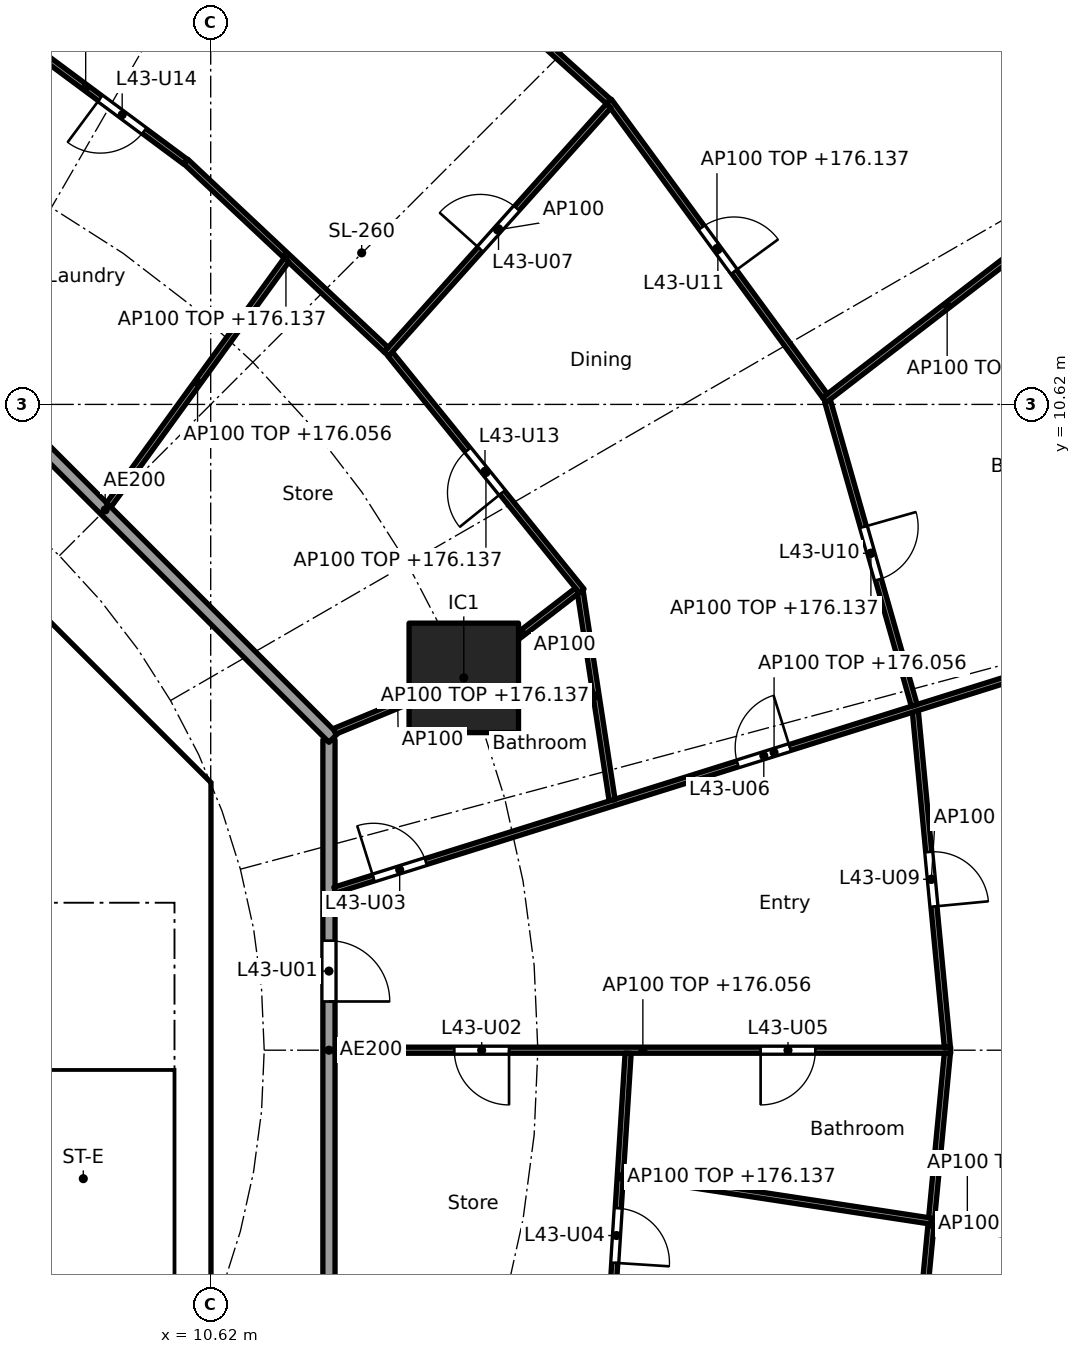
"""IFC4 building model, lengths in metres.
Left out: names, types, materials, properties, quantities, classifications, styles, units other than length and angle.
Written with IfcOpenShell. Run it as: python <this file> out.ifc"""

import sys

from ifc_helpers import new_model, si_unit, direction, frame, frame_2d, origin, origin_2d, place, context, subcontext, project, spatial, polyline, rectangle, outline, extrude, element, fill, save


model = new_model("IFC4")
c1 = context("Model", 3, precision=1e-05, world=origin(), true_north=direction((0.0, 1.0)))
c2 = subcontext(c1, "Body", "Model", "MODEL_VIEW")
j1 = project(units=[si_unit("LENGTHUNIT", "METRE"), si_unit("PLANEANGLEUNIT", "RADIAN")], contexts=[c1])
p1 = place(None, origin())
s1 = spatial("IfcSite", under=j1, at=p1, CompositionType="ELEMENT")
p2 = place(p1, origin())
s2 = spatial("IfcBuilding", under=s1, at=p2, CompositionType="ELEMENT")
p3 = place(p2, frame((0.0, 0.0, 173.3)))
s3 = spatial("IfcBuildingStorey", under=s2, at=p3, CompositionType="ELEMENT", Elevation=173.3)
p4 = place(p3, frame((14.782, 6.123, 0.0), z_axis=(0.0, 0.0, 1.0), x_axis=(1.0, 0.0, 0.0)))
e1 = element("IfcColumn", 1, at=p4, inside=s3, PredefinedType="COLUMN", context=c2, shape_type="SweptSolid", body=[
    extrude(rectangle(XDim=1.8, YDim=1.8, at=origin_2d()), origin(), (0.0, 0.0, 1.0), 3.7),
])
p5 = place(p3, frame((9.988, 4.613, 0.0), z_axis=(0.0, 0.0, 1.0), x_axis=(-0.707106781187, 0.707106781187, 0.0)))
e2 = element("IfcWall", 2, at=p5, inside=s3, PredefinedType="SHEAR", context=c2, shape_type="SweptSolid", body=[
    extrude(rectangle(XDim=7.602, YDim=0.6, at=frame_2d((3.801, 0.0))), origin(), (0.0, 0.0, 1.0), 3.44),
])
p6 = place(p5, frame((3.201, 0.0, 0.0)))
e3 = element("IfcOpeningElement", 3, at=p6, cuts=e2, PredefinedType="OPENING", context=c2, shape_type="SweptSolid", body=[
    extrude(rectangle(XDim=1.2, YDim=2.1, at=frame_2d((0.6, 1.05))), frame((0.0, 0.31, 0.0), z_axis=(0.0, -1.0, 0.0), x_axis=(1.0, 0.0, 0.0)), (0.0, 0.0, 1.0), 0.62),
])
p7 = place(p3, frame((6.7, 4.0, 0.0), z_axis=(0.0, 0.0, 1.0), x_axis=(1.0, 0.0, 0.0)))
e4 = element("IfcWall", 4, at=p7, inside=s3, PredefinedType="SOLIDWALL", context=c2, shape_type="SweptSolid", body=[
    extrude(rectangle(XDim=3.325, YDim=0.2, at=frame_2d((1.662, 0.0))), origin(), (0.0, 0.0, 1.0), 3.44),
])
p8 = place(p7, frame((1.25, 0.0, 0.0)))
e5 = element("IfcOpeningElement", 5, at=p8, cuts=e4, PredefinedType="OPENING", context=c2, shape_type="SweptSolid", body=[
    extrude(rectangle(XDim=1.1, YDim=2.1, at=frame_2d((0.55, 1.05))), frame((0.0, 0.11, 0.0), z_axis=(0.0, -1.0, 0.0), x_axis=(1.0, 0.0, 0.0)), (0.0, 0.0, 1.0), 0.22),
])
p9 = place(p3, origin())
e6 = element("IfcWall", 6, at=p9, inside=s3, PredefinedType="SHEAR", context=c2, shape_type="SweptSolid", body=[
    extrude(outline(polyline([(9.776, -4.401), (10.025, -4.152), (10.025, -3.801), (10.025, 4.152), (9.776, 4.401), (10.2, 4.825), (10.625, 4.401), (10.625, -4.401), (10.2, -4.825), (9.776, -4.401)])), origin(), (0.0, 0.0, 1.0), 3.44),
])
p10 = place(p3, frame((6.138, 14.83, 0.0), z_axis=(0.0, 0.0, 1.0), x_axis=(0.294818517221, 0.955553264818, 0.0)))
e7 = element("IfcWall", 7, at=p10, inside=s3, PredefinedType="PARTITIONING", context=c2, shape_type="SweptSolid", body=[
    extrude(rectangle(XDim=12.619, YDim=0.2, at=frame_2d((6.31, 0.0))), origin(), (0.0, 0.0, 1.0), 2.837),
])
p11 = place(p3, frame((12.565, -5.104, 0.0), z_axis=(0.0, 0.0, 1.0), x_axis=(0.0, 1.0, 0.0)))
e8 = element("IfcWall", 8, at=p11, inside=s3, PredefinedType="PARTITIONING", context=c2, shape_type="SweptSolid", body=[
    extrude(rectangle(XDim=10.209, YDim=0.2, at=frame_2d((5.104, 0.0))), origin(), (0.0, 0.0, 1.0), 3.44),
])
p12 = place(p11, frame((5.906, 0.0, 0.0)))
e9 = element("IfcOpeningElement", 9, at=p12, cuts=e8, PredefinedType="OPENING", context=c2, shape_type="SweptSolid", body=[
    extrude(rectangle(XDim=1.0, YDim=2.1, at=frame_2d((0.5, 1.05))), frame((0.0, 0.11, 0.0), z_axis=(0.0, -1.0, 0.0), x_axis=(1.0, 0.0, 0.0)), (0.0, 0.0, 1.0), 0.22),
])
p13 = place(p3, frame((12.635, 5.134, 0.0), z_axis=(0.0, 0.0, 1.0), x_axis=(-0.707106781187, 0.707106781187, 0.0)))
e10 = element("IfcWall", 10, at=p13, inside=s3, PredefinedType="PARTITIONING", context=c2, shape_type="SweptSolid", body=[
    extrude(rectangle(XDim=10.609, YDim=0.2, at=frame_2d((5.305, 0.0))), origin(), (0.0, 0.0, 1.0), 3.44),
])
p14 = place(p3, frame((12.665, 0.0, 0.0), z_axis=(0.0, 0.0, 1.0), x_axis=(1.0, 0.0, 0.0)))
e11 = element("IfcWall", 11, at=p14, inside=s3, PredefinedType="PARTITIONING", context=c2, shape_type="SweptSolid", body=[
    extrude(rectangle(XDim=10.124, YDim=0.1, at=frame_2d((5.062, 0.0))), origin(), (0.0, 0.0, 1.0), 2.756),
])
p15 = place(p14, frame((1.961, 0.0, 0.0)))
e12 = element("IfcOpeningElement", 12, at=p15, cuts=e11, PredefinedType="OPENING", context=c2, shape_type="SweptSolid", body=[
    extrude(rectangle(XDim=0.9, YDim=2.1, at=frame_2d((0.45, 1.05))), frame((0.0, 0.06, 0.0), z_axis=(0.0, -1.0, 0.0), x_axis=(1.0, 0.0, 0.0)), (0.0, 0.0, 1.0), 0.12),
])
p16 = place(p14, frame((6.999, 0.0, 0.0)))
e13 = element("IfcOpeningElement", 13, at=p16, cuts=e11, PredefinedType="OPENING", context=c2, shape_type="SweptSolid", body=[
    extrude(rectangle(XDim=0.9, YDim=2.1, at=frame_2d((0.45, 1.05))), frame((0.0, 0.06, 0.0), z_axis=(0.0, -1.0, 0.0), x_axis=(1.0, 0.0, 0.0)), (0.0, 0.0, 1.0), 0.12),
])
p17 = place(p3, frame((17.485, -0.05, 0.0), z_axis=(0.0, 0.0, 1.0), x_axis=(-0.063673473968, -0.997970785501, 0.0)))
e14 = element("IfcWall", 14, at=p17, inside=s3, PredefinedType="PARTITIONING", context=c2, shape_type="SweptSolid", body=[
    extrude(rectangle(XDim=4.072, YDim=0.1, at=frame_2d((2.036, 0.0))), origin(), (0.0, 0.0, 1.0), 2.837),
])
p18 = place(p17, frame((2.554, 0.0, 0.0)))
e15 = element("IfcOpeningElement", 15, at=p18, cuts=e14, PredefinedType="OPENING", context=c2, shape_type="SweptSolid", body=[
    extrude(rectangle(XDim=0.9, YDim=2.1, at=frame_2d((0.45, 1.05))), frame((0.0, 0.06, 0.0), z_axis=(0.0, -1.0, 0.0), x_axis=(1.0, 0.0, 0.0)), (0.0, 0.0, 1.0), 0.12),
])
p19 = place(p3, frame((22.734, 0.05, 0.0), z_axis=(0.0, 0.0, 1.0), x_axis=(-0.094923312677, 0.995484587882, 0.0)))
e16 = element("IfcWall", 16, at=p19, inside=s3, PredefinedType="PARTITIONING", context=c2, shape_type="SweptSolid", body=[
    extrude(rectangle(XDim=5.548, YDim=0.1, at=frame_2d((2.774, 0.0))), origin(), (0.0, 0.0, 1.0), 2.837),
])
p20 = place(p19, frame((2.324, 0.0, 0.0)))
e17 = element("IfcOpeningElement", 17, at=p20, cuts=e16, PredefinedType="OPENING", context=c2, shape_type="SweptSolid", body=[
    extrude(rectangle(XDim=0.9, YDim=2.1, at=frame_2d((0.45, 1.05))), frame((0.0, 0.06, 0.0), z_axis=(0.0, -1.0, 0.0), x_axis=(1.0, 0.0, 0.0)), (0.0, 0.0, 1.0), 0.12),
])
p21 = place(p3, frame((22.734, -0.05, 0.0), z_axis=(0.0, 0.0, 1.0), x_axis=(-0.0949274088, -0.995484197292, 0.0)))
e18 = element("IfcWall", 18, at=p21, inside=s3, PredefinedType="PARTITIONING", context=c2, shape_type="SweptSolid", body=[
    extrude(rectangle(XDim=5.648, YDim=0.1, at=frame_2d((2.824, 0.0))), origin(), (0.0, 0.0, 1.0), 2.837),
])
p22 = place(p3, frame((12.66, 2.632, 0.0), z_axis=(0.0, 0.0, 1.0), x_axis=(0.954248738607, 0.299013954302, 0.0)))
e19 = element("IfcWall", 19, at=p22, inside=s3, PredefinedType="PARTITIONING", context=c2, shape_type="SweptSolid", body=[
    extrude(rectangle(XDim=15.142, YDim=0.1, at=frame_2d((7.571, 0.0))), origin(), (0.0, 0.0, 1.0), 2.756),
])
p23 = place(p22, frame((0.669, 0.0, 0.0)))
e20 = element("IfcOpeningElement", 20, at=p23, cuts=e19, PredefinedType="OPENING", context=c2, shape_type="SweptSolid", body=[
    extrude(rectangle(XDim=0.9, YDim=2.1, at=frame_2d((0.45, 1.05))), frame((0.0, 0.06, 0.0), z_axis=(0.0, -1.0, 0.0), x_axis=(1.0, 0.0, 0.0)), (0.0, 0.0, 1.0), 0.12),
])
p24 = place(p22, frame((6.944, 0.0, 0.0)))
e21 = element("IfcOpeningElement", 21, at=p24, cuts=e19, PredefinedType="OPENING", context=c2, shape_type="SweptSolid", body=[
    extrude(rectangle(XDim=0.9, YDim=2.1, at=frame_2d((0.45, 1.05))), frame((0.0, 0.06, 0.0), z_axis=(0.0, -1.0, 0.0), x_axis=(1.0, 0.0, 0.0)), (0.0, 0.0, 1.0), 0.12),
])
p25 = place(p3, frame((17.221, 4.113, 0.0), z_axis=(0.0, 0.0, 1.0), x_axis=(-0.151078880423, 0.988521710379, 0.0)))
e22 = element("IfcWall", 22, at=p25, inside=s3, PredefinedType="PARTITIONING", context=c2, shape_type="SweptSolid", body=[
    extrude(rectangle(XDim=3.469, YDim=0.1, at=frame_2d((1.735, 0.0))), origin(), (0.0, 0.0, 1.0), 2.837),
])
p26 = place(p3, frame((22.189, 5.67, 0.0), z_axis=(0.0, 0.0, 1.0), x_axis=(-0.273815967041, 0.961782104322, 0.0)))
e23 = element("IfcWall", 23, at=p26, inside=s3, PredefinedType="PARTITIONING", context=c2, shape_type="SweptSolid", body=[
    extrude(rectangle(XDim=5.202, YDim=0.1, at=frame_2d((2.601, 0.0))), origin(), (0.0, 0.0, 1.0), 2.837),
])
p27 = place(p26, frame((2.151, 0.0, 0.0)))
e24 = element("IfcOpeningElement", 24, at=p27, cuts=e23, PredefinedType="OPENING", context=c2, shape_type="SweptSolid", body=[
    extrude(rectangle(XDim=0.9, YDim=2.1, at=frame_2d((0.45, 1.05))), frame((0.0, 0.06, 0.0), z_axis=(0.0, -1.0, 0.0), x_axis=(1.0, 0.0, 0.0)), (0.0, 0.0, 1.0), 0.12),
])
p28 = place(p3, frame((12.657, 5.243, 0.0), z_axis=(0.0, 0.0, 1.0), x_axis=(0.923826362943, 0.382811769845, 0.0)))
e25 = element("IfcWall", 25, at=p28, inside=s3, PredefinedType="PARTITIONING", context=c2, shape_type="SweptSolid", body=[
    extrude(rectangle(XDim=2.25, YDim=0.1, at=frame_2d((1.125, 0.0))), origin(), (0.0, 0.0, 1.0), 3.44),
])
p29 = place(p3, frame((14.822, 6.154, 0.0), z_axis=(0.0, 0.0, 1.0), x_axis=(0.792226528082, 0.610227111987, 0.0)))
e26 = element("IfcWall", 26, at=p29, inside=s3, PredefinedType="PARTITIONING", context=c2, shape_type="SweptSolid", body=[
    extrude(rectangle(XDim=2.307, YDim=0.1, at=frame_2d((1.154, 0.0))), origin(), (0.0, 0.0, 1.0), 3.44),
])
p30 = place(p3, frame((16.721, 7.553, 0.0), z_axis=(0.0, 0.0, 1.0), x_axis=(-0.628753513808, 0.777604667472, 0.0)))
e27 = element("IfcWall", 27, at=p30, inside=s3, PredefinedType="PARTITIONING", context=c2, shape_type="SweptSolid", body=[
    extrude(rectangle(XDim=5.007, YDim=0.1, at=frame_2d((2.504, 0.0))), origin(), (0.0, 0.0, 1.0), 2.837),
])
p31 = place(p30, frame((2.079, 0.0, 0.0)))
e28 = element("IfcOpeningElement", 28, at=p31, cuts=e27, PredefinedType="OPENING", context=c2, shape_type="SweptSolid", body=[
    extrude(rectangle(XDim=0.9, YDim=2.1, at=frame_2d((0.45, 1.05))), frame((0.0, 0.06, 0.0), z_axis=(0.0, -1.0, 0.0), x_axis=(1.0, 0.0, 0.0)), (0.0, 0.0, 1.0), 0.12),
])
p32 = place(p3, frame((20.712, 10.691, 0.0), z_axis=(0.0, 0.0, 1.0), x_axis=(0.79220362146, 0.610256849323, 0.0)))
e29 = element("IfcWall", 29, at=p32, inside=s3, PredefinedType="PARTITIONING", context=c2, shape_type="SweptSolid", body=[
    extrude(rectangle(XDim=5.098, YDim=0.1, at=frame_2d((2.549, 0.0))), origin(), (0.0, 0.0, 1.0), 2.837),
])
p33 = place(p3, frame((20.722, 10.762, 0.0), z_axis=(0.0, 0.0, 1.0), x_axis=(-0.591124135033, 0.806580595466, 0.0)))
e30 = element("IfcWall", 30, at=p33, inside=s3, PredefinedType="PARTITIONING", context=c2, shape_type="SweptSolid", body=[
    extrude(rectangle(XDim=6.01, YDim=0.1, at=frame_2d((3.005, 0.0))), origin(), (0.0, 0.0, 1.0), 2.837),
])
p34 = place(p33, frame((2.53, 0.0, 0.0)))
e31 = element("IfcOpeningElement", 31, at=p34, cuts=e30, PredefinedType="OPENING", context=c2, shape_type="SweptSolid", body=[
    extrude(rectangle(XDim=0.9, YDim=2.1, at=frame_2d((0.45, 1.05))), frame((0.0, 0.06, 0.0), z_axis=(0.0, -1.0, 0.0), x_axis=(1.0, 0.0, 0.0)), (0.0, 0.0, 1.0), 0.12),
])
p35 = place(p3, frame((13.507, 11.449, 0.0), z_axis=(0.0, 0.0, 1.0), x_axis=(0.667299792168, 0.744789223453, 0.0)))
e32 = element("IfcWall", 32, at=p35, inside=s3, PredefinedType="PARTITIONING", context=c2, shape_type="SweptSolid", body=[
    extrude(rectangle(XDim=5.482, YDim=0.1, at=frame_2d((2.741, 0.0))), origin(), (0.0, 0.0, 1.0), 3.44),
])
p36 = place(p35, frame((2.316, 0.0, 0.0)))
e33 = element("IfcOpeningElement", 33, at=p36, cuts=e32, PredefinedType="OPENING", context=c2, shape_type="SweptSolid", body=[
    extrude(rectangle(XDim=0.9, YDim=2.1, at=frame_2d((0.45, 1.05))), frame((0.0, 0.06, 0.0), z_axis=(0.0, -1.0, 0.0), x_axis=(1.0, 0.0, 0.0)), (0.0, 0.0, 1.0), 0.12),
])
p37 = place(p3, frame((13.504, 11.52, 0.0), z_axis=(0.0, 0.0, 1.0), x_axis=(-0.728883199496, 0.684638066055, 0.0)))
e34 = element("IfcWall", 34, at=p37, inside=s3, PredefinedType="PARTITIONING", context=c2, shape_type="SweptSolid", body=[
    extrude(rectangle(XDim=4.519, YDim=0.1, at=frame_2d((2.26, 0.0))), origin(), (0.0, 0.0, 1.0), 2.837),
])
p38 = place(p3, frame((17.162, 15.603, 0.0), z_axis=(0.0, 0.0, 1.0), x_axis=(-0.742790086539, 0.66952437397, 0.0)))
e35 = element("IfcWall", 35, at=p38, inside=s3, PredefinedType="PARTITIONING", context=c2, shape_type="SweptSolid", body=[
    extrude(rectangle(XDim=5.542, YDim=0.1, at=frame_2d((2.771, 0.0))), origin(), (0.0, 0.0, 1.0), 2.837),
])
p39 = place(p3, frame((8.943, 8.966, 0.0), z_axis=(0.0, 0.0, 1.0), x_axis=(0.587187896734, 0.809450661825, 0.0)))
e36 = element("IfcWall", 36, at=p39, inside=s3, PredefinedType="PARTITIONING", context=c2, shape_type="SweptSolid", body=[
    extrude(rectangle(XDim=4.975, YDim=0.1, at=frame_2d((2.487, 0.0))), origin(), (0.0, 0.0, 1.0), 2.756),
])
p40 = place(p3, frame((10.207, 14.61, 0.0), z_axis=(0.0, 0.0, 1.0), x_axis=(-0.802769141821, 0.596289950394, 0.0)))
e37 = element("IfcWall", 37, at=p40, inside=s3, PredefinedType="PARTITIONING", context=c2, shape_type="SweptSolid", body=[
    extrude(rectangle(XDim=4.092, YDim=0.1, at=frame_2d((2.046, 0.0))), origin(), (0.0, 0.0, 1.0), 2.837),
])
p41 = place(p40, frame((0.848, 0.0, 0.0)))
e38 = element("IfcOpeningElement", 38, at=p41, cuts=e37, PredefinedType="OPENING", context=c2, shape_type="SweptSolid", body=[
    extrude(rectangle(XDim=0.9, YDim=2.1, at=frame_2d((0.45, 1.05))), frame((0.0, 0.06, 0.0), z_axis=(0.0, -1.0, 0.0), x_axis=(1.0, 0.0, 0.0)), (0.0, 0.0, 1.0), 0.12),
])
p42 = place(p3, frame((17.407, -2.039, 0.0), z_axis=(0.0, 0.0, 1.0), x_axis=(0.98858728603, -0.150649188184, 0.0)))
e39 = element("IfcWall", 39, at=p42, inside=s3, PredefinedType="PARTITIONING", context=c2, shape_type="SweptSolid", body=[
    extrude(rectangle(XDim=11.441, YDim=0.1, at=frame_2d((5.721, 0.0))), origin(), (0.0, 0.0, 1.0), 2.905),
])
p43 = place(p8, frame((1.1, 0.0, 0.0), x_axis=(-1.0, 0.0, 0.0)))
e40 = element("IfcDoor", 40, at=p43, inside=s3, OperationType="SINGLE_SWING_LEFT", PredefinedType="DOOR", context=c2, shape_type="SweptSolid", body=[
    extrude(rectangle(XDim=1.1, YDim=2.1, at=frame_2d((0.55, 1.05))), frame((0.0, 0.025, 0.0), z_axis=(0.0, -1.0, 0.0), x_axis=(1.0, 0.0, 0.0)), (0.0, 0.0, 1.0), 0.05),
])
fill(e5, e40)
p44 = place(p12, frame((1.0, 0.0, 0.0), x_axis=(-1.0, 0.0, 0.0)))
e41 = element("IfcDoor", 41, at=p44, inside=s3, OperationType="SINGLE_SWING_RIGHT", PredefinedType="DOOR", context=c2, shape_type="SweptSolid", body=[
    extrude(rectangle(XDim=1.0, YDim=2.1, at=frame_2d((0.5, 1.05))), frame((0.0, 0.025, 0.0), z_axis=(0.0, -1.0, 0.0), x_axis=(1.0, 0.0, 0.0)), (0.0, 0.0, 1.0), 0.05),
])
fill(e9, e41)
p45 = place(p15, frame((0.9, 0.0, 0.0), x_axis=(-1.0, 0.0, 0.0)))
e42 = element("IfcDoor", 42, at=p45, inside=s3, OperationType="SINGLE_SWING_LEFT", PredefinedType="DOOR", context=c2, shape_type="SweptSolid", body=[
    extrude(rectangle(XDim=0.9, YDim=2.1, at=frame_2d((0.45, 1.05))), frame((0.0, 0.025, 0.0), z_axis=(0.0, -1.0, 0.0), x_axis=(1.0, 0.0, 0.0)), (0.0, 0.0, 1.0), 0.05),
])
fill(e12, e42)
p46 = place(p23, origin())
e43 = element("IfcDoor", 43, at=p46, inside=s3, OperationType="SINGLE_SWING_LEFT", PredefinedType="DOOR", context=c2, shape_type="SweptSolid", body=[
    extrude(rectangle(XDim=0.9, YDim=2.1, at=frame_2d((0.45, 1.05))), frame((0.0, 0.025, 0.0), z_axis=(0.0, -1.0, 0.0), x_axis=(1.0, 0.0, 0.0)), (0.0, 0.0, 1.0), 0.05),
])
fill(e20, e43)
p47 = place(p18, origin())
e44 = element("IfcDoor", 44, at=p47, inside=s3, OperationType="SINGLE_SWING_RIGHT", PredefinedType="DOOR", context=c2, shape_type="SweptSolid", body=[
    extrude(rectangle(XDim=0.9, YDim=2.1, at=frame_2d((0.45, 1.05))), frame((0.0, 0.025, 0.0), z_axis=(0.0, -1.0, 0.0), x_axis=(1.0, 0.0, 0.0)), (0.0, 0.0, 1.0), 0.05),
])
fill(e15, e44)
p48 = place(p16, frame((0.9, 0.0, 0.0), x_axis=(-1.0, 0.0, 0.0)))
e45 = element("IfcDoor", 45, at=p48, inside=s3, OperationType="SINGLE_SWING_RIGHT", PredefinedType="DOOR", context=c2, shape_type="SweptSolid", body=[
    extrude(rectangle(XDim=0.9, YDim=2.1, at=frame_2d((0.45, 1.05))), frame((0.0, 0.025, 0.0), z_axis=(0.0, -1.0, 0.0), x_axis=(1.0, 0.0, 0.0)), (0.0, 0.0, 1.0), 0.05),
])
fill(e13, e45)
p49 = place(p24, origin())
e46 = element("IfcDoor", 46, at=p49, inside=s3, OperationType="SINGLE_SWING_RIGHT", PredefinedType="DOOR", context=c2, shape_type="SweptSolid", body=[
    extrude(rectangle(XDim=0.9, YDim=2.1, at=frame_2d((0.45, 1.05))), frame((0.0, 0.025, 0.0), z_axis=(0.0, -1.0, 0.0), x_axis=(1.0, 0.0, 0.0)), (0.0, 0.0, 1.0), 0.05),
])
fill(e21, e46)
p50 = place(p36, origin())
e47 = element("IfcDoor", 47, at=p50, inside=s3, OperationType="SINGLE_SWING_LEFT", PredefinedType="DOOR", context=c2, shape_type="SweptSolid", body=[
    extrude(rectangle(XDim=0.9, YDim=2.1, at=frame_2d((0.45, 1.05))), frame((0.0, 0.025, 0.0), z_axis=(0.0, -1.0, 0.0), x_axis=(1.0, 0.0, 0.0)), (0.0, 0.0, 1.0), 0.05),
])
fill(e33, e47)
p51 = place(p20, frame((0.9, 0.0, 0.0), x_axis=(-1.0, 0.0, 0.0)))
e48 = element("IfcDoor", 48, at=p51, inside=s3, OperationType="SINGLE_SWING_RIGHT", PredefinedType="DOOR", context=c2, shape_type="SweptSolid", body=[
    extrude(rectangle(XDim=0.9, YDim=2.1, at=frame_2d((0.45, 1.05))), frame((0.0, 0.025, 0.0), z_axis=(0.0, -1.0, 0.0), x_axis=(1.0, 0.0, 0.0)), (0.0, 0.0, 1.0), 0.05),
])
fill(e17, e48)
p52 = place(p27, frame((0.9, 0.0, 0.0), x_axis=(-1.0, 0.0, 0.0)))
e49 = element("IfcDoor", 49, at=p52, inside=s3, OperationType="SINGLE_SWING_LEFT", PredefinedType="DOOR", context=c2, shape_type="SweptSolid", body=[
    extrude(rectangle(XDim=0.9, YDim=2.1, at=frame_2d((0.45, 1.05))), frame((0.0, 0.025, 0.0), z_axis=(0.0, -1.0, 0.0), x_axis=(1.0, 0.0, 0.0)), (0.0, 0.0, 1.0), 0.05),
])
fill(e24, e49)
p53 = place(p34, frame((0.9, 0.0, 0.0), x_axis=(-1.0, 0.0, 0.0)))
e50 = element("IfcDoor", 50, at=p53, inside=s3, OperationType="SINGLE_SWING_RIGHT", PredefinedType="DOOR", context=c2, shape_type="SweptSolid", body=[
    extrude(rectangle(XDim=0.9, YDim=2.1, at=frame_2d((0.45, 1.05))), frame((0.0, 0.025, 0.0), z_axis=(0.0, -1.0, 0.0), x_axis=(1.0, 0.0, 0.0)), (0.0, 0.0, 1.0), 0.05),
])
fill(e31, e50)
p54 = place(p31, origin())
e51 = element("IfcDoor", 51, at=p54, inside=s3, OperationType="SINGLE_SWING_LEFT", PredefinedType="DOOR", context=c2, shape_type="SweptSolid", body=[
    extrude(rectangle(XDim=0.9, YDim=2.1, at=frame_2d((0.45, 1.05))), frame((0.0, 0.025, 0.0), z_axis=(0.0, -1.0, 0.0), x_axis=(1.0, 0.0, 0.0)), (0.0, 0.0, 1.0), 0.05),
])
fill(e28, e51)
p55 = place(p41, origin())
e52 = element("IfcDoor", 52, at=p55, inside=s3, OperationType="SINGLE_SWING_RIGHT", PredefinedType="DOOR", context=c2, shape_type="SweptSolid", body=[
    extrude(rectangle(XDim=0.9, YDim=2.1, at=frame_2d((0.45, 1.05))), frame((0.0, 0.025, 0.0), z_axis=(0.0, -1.0, 0.0), x_axis=(1.0, 0.0, 0.0)), (0.0, 0.0, 1.0), 0.05),
])
fill(e38, e52)
save(model, sys.argv[1])
